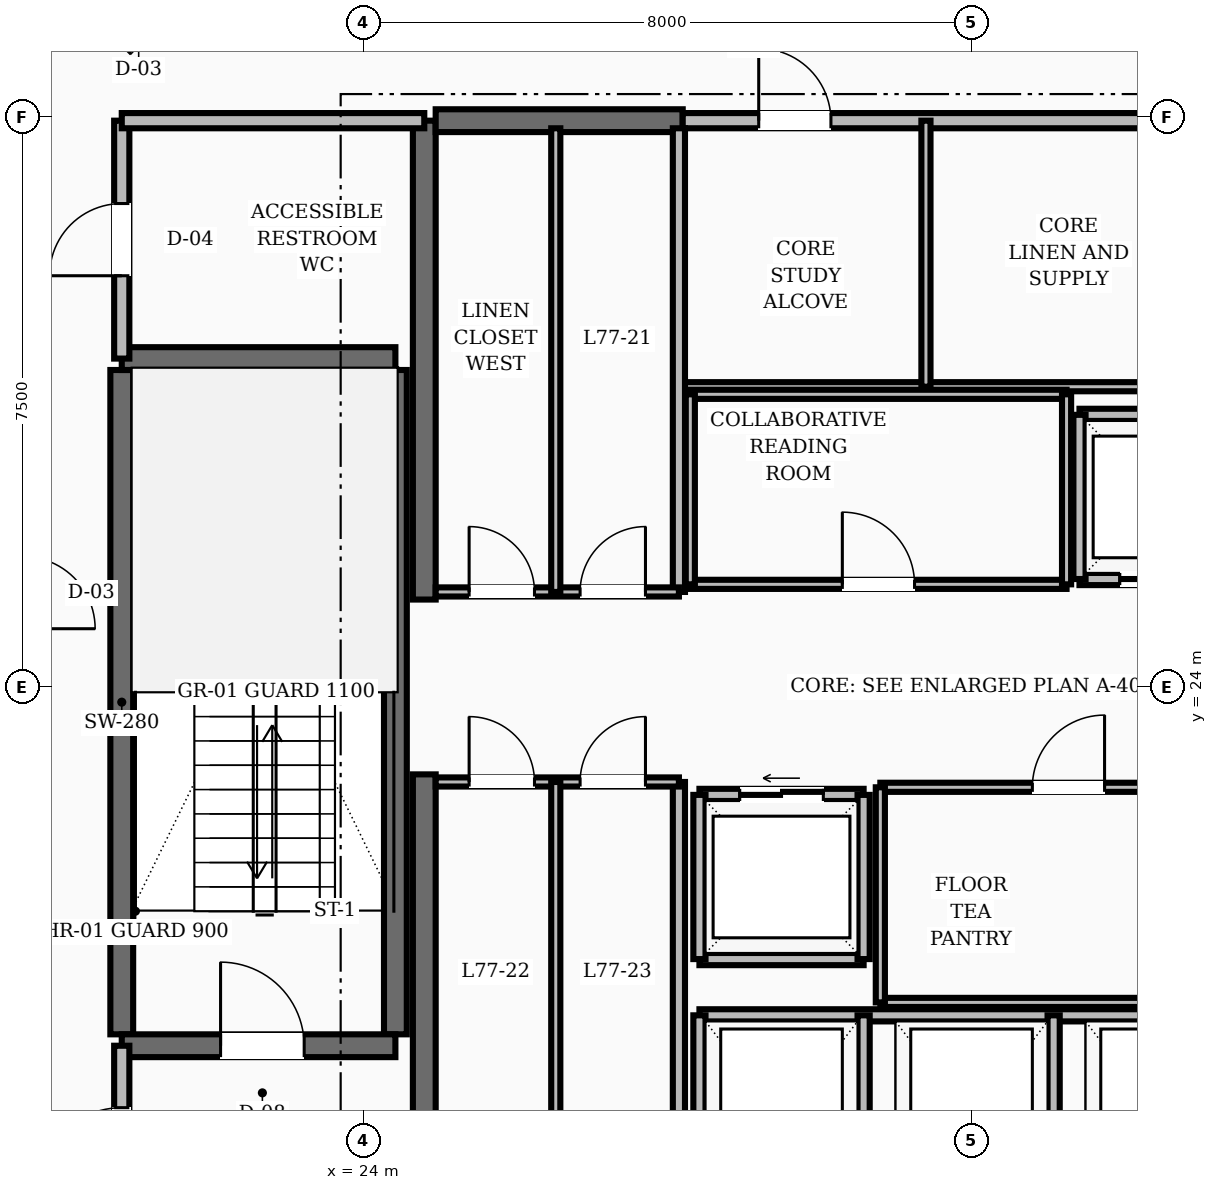
"""IFC4 building model, lengths in metres.
Left out: names, types, materials, properties, quantities, classifications, styles, units other than length and angle.
Written with IfcOpenShell. Run it as: python <this file> out.ifc"""

import sys

from ifc_helpers import new_model, si_unit, direction, frame, frame_2d, origin, place, context, subcontext, project, spatial, rectangle, extrude, element, fill, save


model = new_model("IFC4")
c1 = context("Model", 3, precision=1e-05, world=origin(), true_north=direction((0.0, 1.0)))
c2 = subcontext(c1, "Body", "Model", "MODEL_VIEW")
j1 = project(units=[si_unit("LENGTHUNIT", "METRE"), si_unit("PLANEANGLEUNIT", "RADIAN")], contexts=[c1])
p1 = place(None, origin())
s1 = spatial("IfcSite", under=j1, at=p1, CompositionType="ELEMENT")
p2 = place(p1, origin())
s2 = spatial("IfcBuilding", under=s1, at=p2, CompositionType="ELEMENT")
p3 = place(p2, frame((0.0, 0.0, 294.0)))
s3 = spatial("IfcBuildingStorey", under=s2, at=p3, CompositionType="ELEMENT", Elevation=294.0)
for number, where, z_axis, x_axis in (
    (1, (24.8, 16.55, 0.0), (0.0, 0.0, 1.0), (0.0, 1.0, 0.0)),
    (2, (24.8, 25.15, 0.0), (0.0, 0.0, 1.0), (0.0, 1.0, 0.0)),
):
    element("IfcWall", number, at=place(p3, frame(where, z_axis=z_axis, x_axis=x_axis)), inside=s3, PredefinedType="SHEAR", context=c2, shape_type="SweptSolid", body=[
        extrude(rectangle(XDim=6.3, YDim=0.3, at=frame_2d((3.15, 0.0))), origin(), (0.0, 0.0, 1.0), 3.6),
    ])
p4 = place(p3, frame((24.95, 31.45, 0.0), z_axis=(0.0, 0.0, 1.0), x_axis=(1.0, 0.0, 0.0)))
e3 = element("IfcWall", 3, at=p4, inside=s3, PredefinedType="SHEAR", context=c2, shape_type="SweptSolid", body=[
    extrude(rectangle(XDim=3.25, YDim=0.3, at=frame_2d((1.625, 0.0))), origin(), (0.0, 0.0, 1.0), 3.6),
])
for number, where, z_axis, x_axis in (
    (4, (20.82, 19.43, 0.0), (0.0, 0.0, 1.0), (0.0, 1.0, 0.0)),
    (5, (24.42, 19.43, 0.0), (0.0, 0.0, 1.0), (0.0, 1.0, 0.0)),
):
    element("IfcWall", number, at=place(p3, frame(where, z_axis=z_axis, x_axis=x_axis)), inside=s3, PredefinedType="SHEAR", context=c2, shape_type="SweptSolid", body=[
        extrude(rectangle(XDim=8.74, YDim=0.3, at=frame_2d((4.37, 0.0))), origin(), (0.0, 0.0, 1.0), 3.6),
    ])
p5 = place(p3, frame((20.82, 19.28, 0.0), z_axis=(0.0, 0.0, 1.0), x_axis=(1.0, 0.0, 0.0)))
e6 = element("IfcWall", 6, at=p5, inside=s3, PredefinedType="SHEAR", context=c2, shape_type="SweptSolid", body=[
    extrude(rectangle(XDim=3.6, YDim=0.3, at=frame_2d((1.8, 0.0))), origin(), (0.0, 0.0, 1.0), 3.6),
])
p6 = place(p5, frame((1.3, 0.0, 0.0)))
e7 = element("IfcOpeningElement", 7, at=p6, cuts=e6, PredefinedType="OPENING", context=c2, shape_type="SweptSolid", body=[
    extrude(rectangle(XDim=1.1, YDim=2.1, at=frame_2d((0.55, 1.05))), frame((0.0, 0.16, 0.0), z_axis=(0.0, -1.0, 0.0), x_axis=(1.0, 0.0, 0.0)), (0.0, 0.0, 1.0), 0.32),
])
p7 = place(p3, frame((20.82, 28.32, 0.0), z_axis=(0.0, 0.0, 1.0), x_axis=(1.0, 0.0, 0.0)))
e8 = element("IfcWall", 8, at=p7, inside=s3, PredefinedType="SHEAR", context=c2, shape_type="SweptSolid", body=[
    extrude(rectangle(XDim=3.6, YDim=0.3, at=frame_2d((1.8, 0.0))), origin(), (0.0, 0.0, 1.0), 3.6),
])
p8 = place(p3, frame((20.82, 16.55, 0.0), z_axis=(0.0, 0.0, 1.0), x_axis=(0.0, 1.0, 0.0)))
e9 = element("IfcWall", 9, at=p8, inside=s3, PredefinedType="SOLIDWALL", context=c2, shape_type="SweptSolid", body=[
    extrude(rectangle(XDim=2.73, YDim=0.2, at=frame_2d((1.365, 0.0))), origin(), (0.0, 0.0, 1.0), 2.81),
])
p9 = place(p8, frame((0.815, 0.0, 0.0)))
e10 = element("IfcOpeningElement", 10, at=p9, cuts=e9, PredefinedType="OPENING", context=c2, shape_type="SweptSolid", body=[
    extrude(rectangle(XDim=1.1, YDim=2.1, at=frame_2d((0.55, 1.05))), frame((0.0, 0.11, 0.0), z_axis=(0.0, -1.0, 0.0), x_axis=(1.0, 0.0, 0.0)), (0.0, 0.0, 1.0), 0.22),
])
p10 = place(p3, frame((20.82, 28.32, 0.0), z_axis=(0.0, 0.0, 1.0), x_axis=(0.0, 1.0, 0.0)))
e11 = element("IfcWall", 11, at=p10, inside=s3, PredefinedType="SOLIDWALL", context=c2, shape_type="SweptSolid", body=[
    extrude(rectangle(XDim=3.13, YDim=0.2, at=frame_2d((1.565, 0.0))), origin(), (0.0, 0.0, 1.0), 2.81),
])
p11 = place(p10, frame((1.09, 0.0, 0.0)))
e12 = element("IfcOpeningElement", 12, at=p11, cuts=e11, PredefinedType="OPENING", context=c2, shape_type="SweptSolid", body=[
    extrude(rectangle(XDim=0.95, YDim=2.1, at=frame_2d((0.475, 1.05))), frame((0.0, 0.11, 0.0), z_axis=(0.0, -1.0, 0.0), x_axis=(1.0, 0.0, 0.0)), (0.0, 0.0, 1.0), 0.22),
])
p12 = place(p3, frame((20.82, 31.45, 0.0), z_axis=(0.0, 0.0, 1.0), x_axis=(1.0, 0.0, 0.0)))
e13 = element("IfcWall", 13, at=p12, inside=s3, PredefinedType="SOLIDWALL", context=c2, shape_type="SweptSolid", body=[
    extrude(rectangle(XDim=3.98, YDim=0.2, at=frame_2d((1.99, 0.0))), origin(), (0.0, 0.0, 1.0), 2.81),
])
p13 = place(p3, frame((33.42, 25.42, 0.0), z_axis=(0.0, 0.0, 1.0), x_axis=(1.0, 0.0, 0.0)))
e14 = element("IfcWall", 14, at=p13, inside=s3, PredefinedType="SOLIDWALL", context=c2, shape_type="SweptSolid", body=[
    extrude(rectangle(XDim=2.16, YDim=0.16, at=frame_2d((1.08, 0.0))), origin(), (0.0, 0.0, 1.0), 2.81),
])
p14 = place(p13, frame((0.53, 0.0, 0.0)))
e15 = element("IfcOpeningElement", 15, at=p14, cuts=e14, PredefinedType="OPENING", context=c2, shape_type="SweptSolid", body=[
    extrude(rectangle(XDim=1.1, YDim=2.15, at=frame_2d((0.55, 1.075))), frame((0.0, 0.09, 0.0), z_axis=(0.0, -1.0, 0.0), x_axis=(1.0, 0.0, 0.0)), (0.0, 0.0, 1.0), 0.18),
])
for number, where, z_axis, x_axis in (
    (16, (33.42, 27.58, 0.0), (0.0, 0.0, 1.0), (1.0, 0.0, 0.0)),
    (17, (33.42, 25.42, 0.0), (0.0, 0.0, 1.0), (0.0, 1.0, 0.0)),
):
    element("IfcWall", number, at=place(p3, frame(where, z_axis=z_axis, x_axis=x_axis)), inside=s3, PredefinedType="SOLIDWALL", context=c2, shape_type="SweptSolid", body=[
        extrude(rectangle(XDim=2.16, YDim=0.16, at=frame_2d((1.08, 0.0))), origin(), (0.0, 0.0, 1.0), 2.81),
    ])
p15 = place(p3, frame((28.42, 22.58, 0.0), z_axis=(0.0, 0.0, 1.0), x_axis=(1.0, 0.0, 0.0)))
e18 = element("IfcWall", 18, at=p15, inside=s3, PredefinedType="SOLIDWALL", context=c2, shape_type="SweptSolid", body=[
    extrude(rectangle(XDim=2.16, YDim=0.16, at=frame_2d((1.08, 0.0))), origin(), (0.0, 0.0, 1.0), 2.81),
])
p16 = place(p15, frame((0.53, 0.0, 0.0)))
e19 = element("IfcOpeningElement", 19, at=p16, cuts=e18, PredefinedType="OPENING", context=c2, shape_type="SweptSolid", body=[
    extrude(rectangle(XDim=1.1, YDim=2.15, at=frame_2d((0.55, 1.075))), frame((0.0, 0.09, 0.0), z_axis=(0.0, -1.0, 0.0), x_axis=(1.0, 0.0, 0.0)), (0.0, 0.0, 1.0), 0.18),
])
for number, where, z_axis, x_axis in (
    (20, (28.42, 20.42, 0.0), (0.0, 0.0, 1.0), (1.0, 0.0, 0.0)),
    (21, (28.42, 20.42, 0.0), (0.0, 0.0, 1.0), (0.0, 1.0, 0.0)),
    (22, (30.58, 20.42, 0.0), (0.0, 0.0, 1.0), (0.0, 1.0, 0.0)),
):
    element("IfcWall", number, at=place(p3, frame(where, z_axis=z_axis, x_axis=x_axis)), inside=s3, PredefinedType="SOLIDWALL", context=c2, shape_type="SweptSolid", body=[
        extrude(rectangle(XDim=2.16, YDim=0.16, at=frame_2d((1.08, 0.0))), origin(), (0.0, 0.0, 1.0), 2.81),
    ])
p17 = place(p3, frame((28.42, 19.68, 0.0), z_axis=(0.0, 0.0, 1.0), x_axis=(1.0, 0.0, 0.0)))
e23 = element("IfcWall", 23, at=p17, inside=s3, PredefinedType="SOLIDWALL", context=c2, shape_type="SweptSolid", body=[
    extrude(rectangle(XDim=7.16, YDim=0.16, at=frame_2d((3.58, 0.0))), origin(), (0.0, 0.0, 1.0), 2.81),
])
for number, where, z_axis, x_axis in (
    (24, (28.42, 16.92, 0.0), (0.0, 0.0, 1.0), (0.0, 1.0, 0.0)),
    (25, (30.58, 16.92, 0.0), (0.0, 0.0, 1.0), (0.0, 1.0, 0.0)),
    (26, (33.08, 16.92, 0.0), (0.0, 0.0, 1.0), (0.0, 1.0, 0.0)),
):
    element("IfcWall", number, at=place(p3, frame(where, z_axis=z_axis, x_axis=x_axis)), inside=s3, PredefinedType="SOLIDWALL", context=c2, shape_type="SweptSolid", body=[
        extrude(rectangle(XDim=2.76, YDim=0.16, at=frame_2d((1.38, 0.0))), origin(), (0.0, 0.0, 1.0), 2.81),
    ])
p18 = place(p3, frame((28.2, 31.45, 0.0), z_axis=(0.0, 0.0, 1.0), x_axis=(1.0, 0.0, 0.0)))
e27 = element("IfcWall", 27, at=p18, inside=s3, PredefinedType="SOLIDWALL", context=c2, shape_type="SweptSolid", body=[
    extrude(rectangle(XDim=7.6, YDim=0.2, at=frame_2d((3.8, 0.0))), origin(), (0.0, 0.0, 1.0), 2.81),
])
p19 = place(p18, frame((1.0, 0.0, 0.0)))
e28 = element("IfcOpeningElement", 28, at=p19, cuts=e27, PredefinedType="OPENING", context=c2, shape_type="SweptSolid", body=[
    extrude(rectangle(XDim=0.95, YDim=2.1, at=frame_2d((0.475, 1.05))), frame((0.0, 0.11, 0.0), z_axis=(0.0, -1.0, 0.0), x_axis=(1.0, 0.0, 0.0)), (0.0, 0.0, 1.0), 0.22),
])
p20 = place(p3, frame((28.2, 27.95, 0.0), z_axis=(0.0, 0.0, 1.0), x_axis=(1.0, 0.0, 0.0)))
e29 = element("IfcWall", 29, at=p20, inside=s3, PredefinedType="PARTITIONING", context=c2, shape_type="SweptSolid", body=[
    extrude(rectangle(XDim=7.6, YDim=0.12, at=frame_2d((3.8, 0.0))), origin(), (0.0, 0.0, 1.0), 2.81),
])
p21 = place(p3, frame((31.4, 27.95, 0.0), z_axis=(0.0, 0.0, 1.0), x_axis=(0.0, 1.0, 0.0)))
e30 = element("IfcWall", 30, at=p21, inside=s3, PredefinedType="PARTITIONING", context=c2, shape_type="SweptSolid", body=[
    extrude(rectangle(XDim=3.5, YDim=0.12, at=frame_2d((1.75, 0.0))), origin(), (0.0, 0.0, 1.0), 2.81),
])
p22 = place(p3, frame((28.3, 25.35, 0.0), z_axis=(0.0, 0.0, 1.0), x_axis=(1.0, 0.0, 0.0)))
e31 = element("IfcWall", 31, at=p22, inside=s3, PredefinedType="PARTITIONING", context=c2, shape_type="SweptSolid", body=[
    extrude(rectangle(XDim=4.95, YDim=0.12, at=frame_2d((2.475, 0.0))), origin(), (0.0, 0.0, 1.0), 2.81),
])
p23 = place(p22, frame((2.0, 0.0, 0.0)))
e32 = element("IfcOpeningElement", 32, at=p23, cuts=e31, PredefinedType="OPENING", context=c2, shape_type="SweptSolid", body=[
    extrude(rectangle(XDim=0.95, YDim=2.1, at=frame_2d((0.475, 1.05))), frame((0.0, 0.07, 0.0), z_axis=(0.0, -1.0, 0.0), x_axis=(1.0, 0.0, 0.0)), (0.0, 0.0, 1.0), 0.14),
])
p24 = place(p3, frame((28.3, 27.85, 0.0), z_axis=(0.0, 0.0, 1.0), x_axis=(1.0, 0.0, 0.0)))
e33 = element("IfcWall", 33, at=p24, inside=s3, PredefinedType="PARTITIONING", context=c2, shape_type="SweptSolid", body=[
    extrude(rectangle(XDim=4.95, YDim=0.12, at=frame_2d((2.475, 0.0))), origin(), (0.0, 0.0, 1.0), 2.81),
])
for number, where, z_axis, x_axis in (
    (34, (28.3, 25.35, 0.0), (0.0, 0.0, 1.0), (0.0, 1.0, 0.0)),
    (35, (33.25, 25.35, 0.0), (0.0, 0.0, 1.0), (0.0, 1.0, 0.0)),
):
    element("IfcWall", number, at=place(p3, frame(where, z_axis=z_axis, x_axis=x_axis)), inside=s3, PredefinedType="PARTITIONING", context=c2, shape_type="SweptSolid", body=[
        extrude(rectangle(XDim=2.5, YDim=0.12, at=frame_2d((1.25, 0.0))), origin(), (0.0, 0.0, 1.0), 2.81),
    ])
p25 = place(p3, frame((30.8, 22.68, 0.0), z_axis=(0.0, 0.0, 1.0), x_axis=(1.0, 0.0, 0.0)))
e36 = element("IfcWall", 36, at=p25, inside=s3, PredefinedType="PARTITIONING", context=c2, shape_type="SweptSolid", body=[
    extrude(rectangle(XDim=4.95, YDim=0.12, at=frame_2d((2.475, 0.0))), origin(), (0.0, 0.0, 1.0), 2.81),
])
p26 = place(p25, frame((2.0, 0.0, 0.0)))
e37 = element("IfcOpeningElement", 37, at=p26, cuts=e36, PredefinedType="OPENING", context=c2, shape_type="SweptSolid", body=[
    extrude(rectangle(XDim=0.95, YDim=2.1, at=frame_2d((0.475, 1.05))), frame((0.0, 0.07, 0.0), z_axis=(0.0, -1.0, 0.0), x_axis=(1.0, 0.0, 0.0)), (0.0, 0.0, 1.0), 0.14),
])
p27 = place(p3, frame((30.8, 19.85, 0.0), z_axis=(0.0, 0.0, 1.0), x_axis=(1.0, 0.0, 0.0)))
e38 = element("IfcWall", 38, at=p27, inside=s3, PredefinedType="PARTITIONING", context=c2, shape_type="SweptSolid", body=[
    extrude(rectangle(XDim=4.95, YDim=0.12, at=frame_2d((2.475, 0.0))), origin(), (0.0, 0.0, 1.0), 2.81),
])
p28 = place(p3, frame((30.8, 19.85, 0.0), z_axis=(0.0, 0.0, 1.0), x_axis=(0.0, 1.0, 0.0)))
e39 = element("IfcWall", 39, at=p28, inside=s3, PredefinedType="PARTITIONING", context=c2, shape_type="SweptSolid", body=[
    extrude(rectangle(XDim=2.83, YDim=0.12, at=frame_2d((1.415, 0.0))), origin(), (0.0, 0.0, 1.0), 2.81),
])
p29 = place(p3, frame((28.15, 16.7, 0.0), z_axis=(0.0, 0.0, 1.0), x_axis=(0.0, 1.0, 0.0)))
e40 = element("IfcWall", 40, at=p29, inside=s3, PredefinedType="SOLIDWALL", context=c2, shape_type="SweptSolid", body=[
    extrude(rectangle(XDim=6.05, YDim=0.16, at=frame_2d((3.025, 0.0))), origin(), (0.0, 0.0, 1.0), 2.81),
])
p30 = place(p3, frame((28.15, 25.25, 0.0), z_axis=(0.0, 0.0, 1.0), x_axis=(0.0, 1.0, 0.0)))
e41 = element("IfcWall", 41, at=p30, inside=s3, PredefinedType="SOLIDWALL", context=c2, shape_type="SweptSolid", body=[
    extrude(rectangle(XDim=6.1, YDim=0.16, at=frame_2d((3.05, 0.0))), origin(), (0.0, 0.0, 1.0), 2.81),
])
p31 = place(p3, frame((24.95, 25.25, 0.0), z_axis=(0.0, 0.0, 1.0), x_axis=(1.0, 0.0, 0.0)))
e42 = element("IfcWall", 42, at=p31, inside=s3, PredefinedType="PARTITIONING", context=c2, shape_type="SweptSolid", body=[
    extrude(rectangle(XDim=3.2, YDim=0.12, at=frame_2d((1.6, 0.0))), origin(), (0.0, 0.0, 1.0), 2.81),
])
p32 = place(p31, frame((0.44, 0.0, 0.0)))
e43 = element("IfcOpeningElement", 43, at=p32, cuts=e42, PredefinedType="OPENING", context=c2, shape_type="SweptSolid", body=[
    extrude(rectangle(XDim=0.86, YDim=2.1, at=frame_2d((0.43, 1.05))), frame((0.0, 0.07, 0.0), z_axis=(0.0, -1.0, 0.0), x_axis=(1.0, 0.0, 0.0)), (0.0, 0.0, 1.0), 0.14),
])
p33 = place(p31, frame((1.9, 0.0, 0.0)))
e44 = element("IfcOpeningElement", 44, at=p33, cuts=e42, PredefinedType="OPENING", context=c2, shape_type="SweptSolid", body=[
    extrude(rectangle(XDim=0.86, YDim=2.1, at=frame_2d((0.43, 1.05))), frame((0.0, 0.07, 0.0), z_axis=(0.0, -1.0, 0.0), x_axis=(1.0, 0.0, 0.0)), (0.0, 0.0, 1.0), 0.14),
])
p34 = place(p3, frame((24.95, 22.75, 0.0), z_axis=(0.0, 0.0, 1.0), x_axis=(1.0, 0.0, 0.0)))
e45 = element("IfcWall", 45, at=p34, inside=s3, PredefinedType="PARTITIONING", context=c2, shape_type="SweptSolid", body=[
    extrude(rectangle(XDim=3.2, YDim=0.12, at=frame_2d((1.6, 0.0))), origin(), (0.0, 0.0, 1.0), 2.81),
])
p35 = place(p34, frame((0.44, 0.0, 0.0)))
e46 = element("IfcOpeningElement", 46, at=p35, cuts=e45, PredefinedType="OPENING", context=c2, shape_type="SweptSolid", body=[
    extrude(rectangle(XDim=0.86, YDim=2.1, at=frame_2d((0.43, 1.05))), frame((0.0, 0.07, 0.0), z_axis=(0.0, -1.0, 0.0), x_axis=(1.0, 0.0, 0.0)), (0.0, 0.0, 1.0), 0.14),
])
p36 = place(p34, frame((1.9, 0.0, 0.0)))
e47 = element("IfcOpeningElement", 47, at=p36, cuts=e45, PredefinedType="OPENING", context=c2, shape_type="SweptSolid", body=[
    extrude(rectangle(XDim=0.86, YDim=2.1, at=frame_2d((0.43, 1.05))), frame((0.0, 0.07, 0.0), z_axis=(0.0, -1.0, 0.0), x_axis=(1.0, 0.0, 0.0)), (0.0, 0.0, 1.0), 0.14),
])
p37 = place(p3, frame((26.53, 25.25, 0.0), z_axis=(0.0, 0.0, 1.0), x_axis=(0.0, 1.0, 0.0)))
e48 = element("IfcWall", 48, at=p37, inside=s3, PredefinedType="PARTITIONING", context=c2, shape_type="SweptSolid", body=[
    extrude(rectangle(XDim=6.1, YDim=0.12, at=frame_2d((3.05, 0.0))), origin(), (0.0, 0.0, 1.0), 2.81),
])
p38 = place(p3, frame((26.53, 18.3, 0.0), z_axis=(0.0, 0.0, 1.0), x_axis=(0.0, 1.0, 0.0)))
e49 = element("IfcWall", 49, at=p38, inside=s3, PredefinedType="PARTITIONING", context=c2, shape_type="SweptSolid", body=[
    extrude(rectangle(XDim=4.45, YDim=0.12, at=frame_2d((2.225, 0.0))), origin(), (0.0, 0.0, 1.0), 2.81),
])
p39 = place(p3, frame((21.635, 34.365, 0.0), z_axis=(0.0, 0.0, 1.0), x_axis=(-0.707106781187, -0.707106781187, 0.0)))
e50 = element("IfcWall", 50, at=p39, inside=s3, PredefinedType="SOLIDWALL", context=c2, shape_type="SweptSolid", body=[
    extrude(rectangle(XDim=2.916, YDim=0.16, at=frame_2d((1.458, 0.0))), origin(), (0.0, 0.0, 1.0), 2.81),
])
p40 = place(p39, frame((0.983, 0.0, 0.0)))
e51 = element("IfcOpeningElement", 51, at=p40, cuts=e50, PredefinedType="OPENING", context=c2, shape_type="SweptSolid", body=[
    extrude(rectangle(XDim=0.95, YDim=2.1, at=frame_2d((0.475, 1.05))), frame((0.0, 0.09, 0.0), z_axis=(0.0, -1.0, 0.0), x_axis=(1.0, 0.0, 0.0)), (0.0, 0.0, 1.0), 0.18),
])
p41 = place(p6, origin())
e52 = element("IfcDoor", 52, at=p41, inside=s3, OperationType="SINGLE_SWING_LEFT", PredefinedType="DOOR", context=c2, shape_type="SweptSolid", body=[
    extrude(rectangle(XDim=1.1, YDim=2.1, at=frame_2d((0.55, 1.05))), frame((0.0, 0.025, 0.0), z_axis=(0.0, -1.0, 0.0), x_axis=(1.0, 0.0, 0.0)), (0.0, 0.0, 1.0), 0.05),
])
fill(e7, e52)
p42 = place(p9, origin())
e53 = element("IfcDoor", 53, at=p42, inside=s3, OperationType="SINGLE_SWING_LEFT", PredefinedType="DOOR", context=c2, shape_type="SweptSolid", body=[
    extrude(rectangle(XDim=1.1, YDim=2.1, at=frame_2d((0.55, 1.05))), frame((0.0, 0.025, 0.0), z_axis=(0.0, -1.0, 0.0), x_axis=(1.0, 0.0, 0.0)), (0.0, 0.0, 1.0), 0.05),
])
fill(e10, e53)
p43 = place(p11, origin())
e54 = element("IfcDoor", 54, at=p43, inside=s3, OperationType="SINGLE_SWING_LEFT", PredefinedType="DOOR", context=c2, shape_type="SweptSolid", body=[
    extrude(rectangle(XDim=0.95, YDim=2.1, at=frame_2d((0.475, 1.05))), frame((0.0, 0.025, 0.0), z_axis=(0.0, -1.0, 0.0), x_axis=(1.0, 0.0, 0.0)), (0.0, 0.0, 1.0), 0.05),
])
fill(e12, e54)
p44 = place(p14, origin())
e55 = element("IfcDoor", 55, at=p44, inside=s3, OperationType="SLIDING_TO_RIGHT", PredefinedType="DOOR", context=c2, shape_type="SweptSolid", body=[
    extrude(rectangle(XDim=1.1, YDim=2.15, at=frame_2d((0.55, 1.075))), frame((0.0, 0.025, 0.0), z_axis=(0.0, -1.0, 0.0), x_axis=(1.0, 0.0, 0.0)), (0.0, 0.0, 1.0), 0.05),
])
fill(e15, e55)
p45 = place(p16, origin())
e56 = element("IfcDoor", 56, at=p45, inside=s3, OperationType="SLIDING_TO_LEFT", PredefinedType="DOOR", context=c2, shape_type="SweptSolid", body=[
    extrude(rectangle(XDim=1.1, YDim=2.15, at=frame_2d((0.55, 1.075))), frame((0.0, 0.025, 0.0), z_axis=(0.0, -1.0, 0.0), x_axis=(1.0, 0.0, 0.0)), (0.0, 0.0, 1.0), 0.05),
])
fill(e19, e56)
p46 = place(p19, origin())
e57 = element("IfcDoor", 57, at=p46, inside=s3, OperationType="SINGLE_SWING_LEFT", PredefinedType="DOOR", context=c2, shape_type="SweptSolid", body=[
    extrude(rectangle(XDim=0.95, YDim=2.1, at=frame_2d((0.475, 1.05))), frame((0.0, 0.025, 0.0), z_axis=(0.0, -1.0, 0.0), x_axis=(1.0, 0.0, 0.0)), (0.0, 0.0, 1.0), 0.05),
])
fill(e28, e57)
p47 = place(p23, origin())
e58 = element("IfcDoor", 58, at=p47, inside=s3, OperationType="SINGLE_SWING_LEFT", PredefinedType="DOOR", context=c2, shape_type="SweptSolid", body=[
    extrude(rectangle(XDim=0.95, YDim=2.1, at=frame_2d((0.475, 1.05))), frame((0.0, 0.025, 0.0), z_axis=(0.0, -1.0, 0.0), x_axis=(1.0, 0.0, 0.0)), (0.0, 0.0, 1.0), 0.05),
])
fill(e32, e58)
p48 = place(p26, origin())
e59 = element("IfcDoor", 59, at=p48, inside=s3, OperationType="SINGLE_SWING_RIGHT", PredefinedType="DOOR", context=c2, shape_type="SweptSolid", body=[
    extrude(rectangle(XDim=0.95, YDim=2.1, at=frame_2d((0.475, 1.05))), frame((0.0, 0.025, 0.0), z_axis=(0.0, -1.0, 0.0), x_axis=(1.0, 0.0, 0.0)), (0.0, 0.0, 1.0), 0.05),
])
fill(e37, e59)
p49 = place(p32, origin())
e60 = element("IfcDoor", 60, at=p49, inside=s3, OperationType="SINGLE_SWING_LEFT", PredefinedType="DOOR", context=c2, shape_type="SweptSolid", body=[
    extrude(rectangle(XDim=0.86, YDim=2.1, at=frame_2d((0.43, 1.05))), frame((0.0, 0.025, 0.0), z_axis=(0.0, -1.0, 0.0), x_axis=(1.0, 0.0, 0.0)), (0.0, 0.0, 1.0), 0.05),
])
fill(e43, e60)
p50 = place(p33, origin())
e61 = element("IfcDoor", 61, at=p50, inside=s3, OperationType="SINGLE_SWING_RIGHT", PredefinedType="DOOR", context=c2, shape_type="SweptSolid", body=[
    extrude(rectangle(XDim=0.86, YDim=2.1, at=frame_2d((0.43, 1.05))), frame((0.0, 0.025, 0.0), z_axis=(0.0, -1.0, 0.0), x_axis=(1.0, 0.0, 0.0)), (0.0, 0.0, 1.0), 0.05),
])
fill(e44, e61)
p51 = place(p35, origin())
e62 = element("IfcDoor", 62, at=p51, inside=s3, OperationType="SINGLE_SWING_LEFT", PredefinedType="DOOR", context=c2, shape_type="SweptSolid", body=[
    extrude(rectangle(XDim=0.86, YDim=2.1, at=frame_2d((0.43, 1.05))), frame((0.0, 0.025, 0.0), z_axis=(0.0, -1.0, 0.0), x_axis=(1.0, 0.0, 0.0)), (0.0, 0.0, 1.0), 0.05),
])
fill(e46, e62)
p52 = place(p36, origin())
e63 = element("IfcDoor", 63, at=p52, inside=s3, OperationType="SINGLE_SWING_RIGHT", PredefinedType="DOOR", context=c2, shape_type="SweptSolid", body=[
    extrude(rectangle(XDim=0.86, YDim=2.1, at=frame_2d((0.43, 1.05))), frame((0.0, 0.025, 0.0), z_axis=(0.0, -1.0, 0.0), x_axis=(1.0, 0.0, 0.0)), (0.0, 0.0, 1.0), 0.05),
])
fill(e47, e63)
save(model, sys.argv[1])
